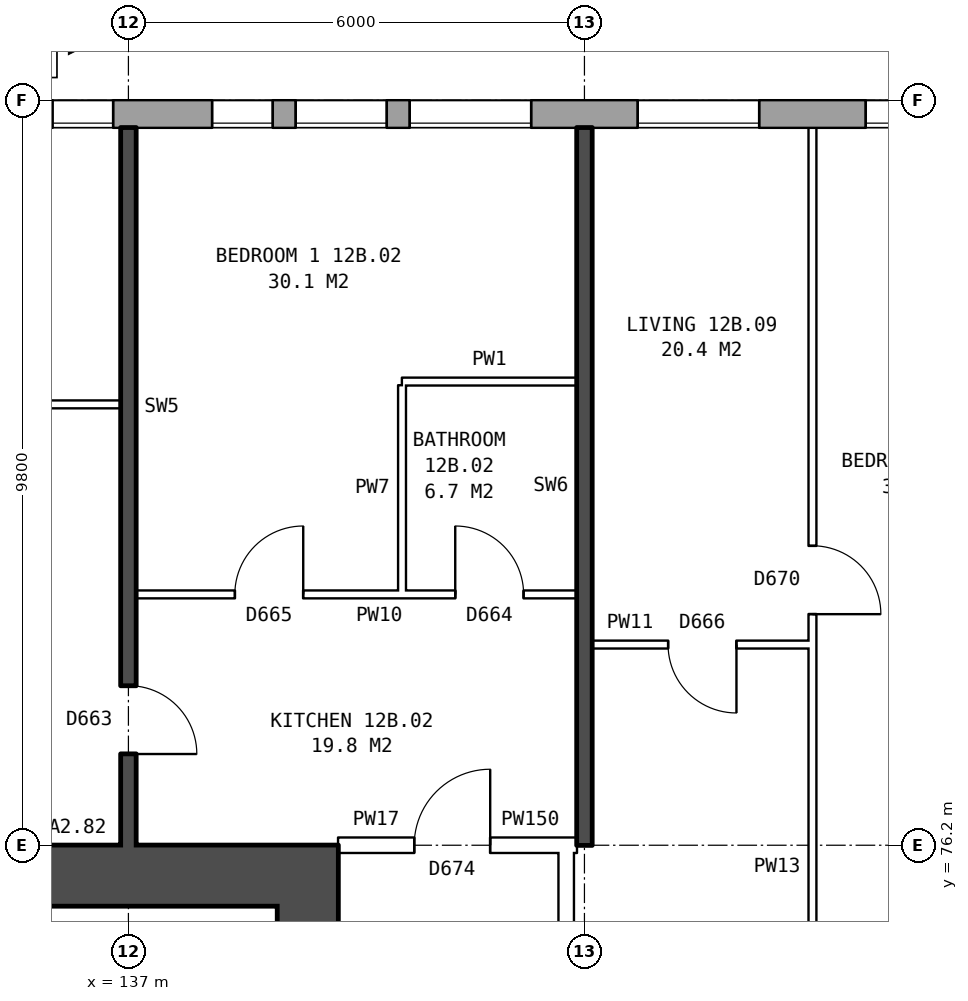
"""IFC4 building model, lengths in metres.
Left out: names, types, materials, properties, quantities, classifications, styles, units other than length and angle.
Written with IfcOpenShell. Run it as: python <this file> out.ifc"""

import sys

from ifc_helpers import new_model, si_unit, direction, frame, frame_2d, origin, place, context, subcontext, project, spatial, rectangle, extrude, element, fill, save


model = new_model("IFC4")
c1 = context("Model", 3, precision=1e-05, world=origin(), true_north=direction((0.0, 1.0)))
c2 = subcontext(c1, "Body", "Model", "MODEL_VIEW")
j1 = project(units=[si_unit("LENGTHUNIT", "METRE"), si_unit("PLANEANGLEUNIT", "RADIAN")], contexts=[c1])
p1 = place(None, origin())
s1 = spatial("IfcSite", under=j1, at=p1, CompositionType="ELEMENT")
p2 = place(p1, origin())
s2 = spatial("IfcBuilding", under=s1, at=p2, CompositionType="ELEMENT")
p3 = place(p2, frame((0.0, 0.0, 47.4)))
s3 = spatial("IfcBuildingStorey", under=s2, at=p3, CompositionType="ELEMENT", Elevation=47.4)
p4 = place(p3, frame((173.425, 85.82, 0.0), z_axis=(0.0, 0.0, 1.0), x_axis=(-1.0, 0.0, 0.0)))
e1 = element("IfcWall", 1, at=p4, inside=s3, PredefinedType="STANDARD", context=c2, shape_type="SweptSolid", body=[
    extrude(rectangle(XDim=39.351, YDim=0.36, at=frame_2d((19.675, 0.0))), origin(), (0.0, 0.0, 1.0), 2.85),
])
p5 = place(p4, frame((0.625, 0.0, 0.8)))
e2 = element("IfcOpeningElement", 2, at=p5, cuts=e1, PredefinedType="OPENING", context=c2, shape_type="SweptSolid", body=[
    extrude(rectangle(XDim=1.0, YDim=1.8, at=frame_2d((0.5, 0.9))), frame((0.0, 0.19, 0.0), z_axis=(0.0, -1.0, 0.0), x_axis=(1.0, 0.0, 0.0)), (0.0, 0.0, 1.0), 0.38),
])
p6 = place(p4, frame((1.925, 0.0, 1.7)))
e3 = element("IfcOpeningElement", 3, at=p6, cuts=e1, PredefinedType="OPENING", context=c2, shape_type="SweptSolid", body=[
    extrude(rectangle(XDim=0.8, YDim=0.9, at=frame_2d((0.4, 0.45))), frame((0.0, 0.19, 0.0), z_axis=(0.0, -1.0, 0.0), x_axis=(1.0, 0.0, 0.0)), (0.0, 0.0, 1.0), 0.38),
])
p7 = place(p4, frame((7.125, 0.0, 0.8)))
e4 = element("IfcOpeningElement", 4, at=p7, cuts=e1, PredefinedType="OPENING", context=c2, shape_type="SweptSolid", body=[
    extrude(rectangle(XDim=1.6, YDim=1.8, at=frame_2d((0.8, 0.9))), frame((0.0, 0.19, 0.0), z_axis=(0.0, -1.0, 0.0), x_axis=(1.0, 0.0, 0.0)), (0.0, 0.0, 1.0), 0.38),
])
p8 = place(p4, frame((10.125, 0.0, 0.8)))
e5 = element("IfcOpeningElement", 5, at=p8, cuts=e1, PredefinedType="OPENING", context=c2, shape_type="SweptSolid", body=[
    extrude(rectangle(XDim=1.6, YDim=1.8, at=frame_2d((0.8, 0.9))), frame((0.0, 0.19, 0.0), z_axis=(0.0, -1.0, 0.0), x_axis=(1.0, 0.0, 0.0)), (0.0, 0.0, 1.0), 0.38),
])
p9 = place(p4, frame((13.125, 0.0, 0.8)))
e6 = element("IfcOpeningElement", 6, at=p9, cuts=e1, PredefinedType="OPENING", context=c2, shape_type="SweptSolid", body=[
    extrude(rectangle(XDim=1.6, YDim=1.8, at=frame_2d((0.8, 0.9))), frame((0.0, 0.19, 0.0), z_axis=(0.0, -1.0, 0.0), x_axis=(1.0, 0.0, 0.0)), (0.0, 0.0, 1.0), 0.38),
])
p10 = place(p4, frame((16.125, 0.0, 0.8)))
e7 = element("IfcOpeningElement", 7, at=p10, cuts=e1, PredefinedType="OPENING", context=c2, shape_type="SweptSolid", body=[
    extrude(rectangle(XDim=1.6, YDim=1.8, at=frame_2d((0.8, 0.9))), frame((0.0, 0.19, 0.0), z_axis=(0.0, -1.0, 0.0), x_axis=(1.0, 0.0, 0.0)), (0.0, 0.0, 1.0), 0.38),
])
p11 = place(p4, frame((19.125, 0.0, 0.8)))
e8 = element("IfcOpeningElement", 8, at=p11, cuts=e1, PredefinedType="OPENING", context=c2, shape_type="SweptSolid", body=[
    extrude(rectangle(XDim=1.6, YDim=1.8, at=frame_2d((0.8, 0.9))), frame((0.0, 0.19, 0.0), z_axis=(0.0, -1.0, 0.0), x_axis=(1.0, 0.0, 0.0)), (0.0, 0.0, 1.0), 0.38),
])
p12 = place(p4, frame((22.125, 0.0, 0.8)))
e9 = element("IfcOpeningElement", 9, at=p12, cuts=e1, PredefinedType="OPENING", context=c2, shape_type="SweptSolid", body=[
    extrude(rectangle(XDim=1.6, YDim=1.8, at=frame_2d((0.8, 0.9))), frame((0.0, 0.19, 0.0), z_axis=(0.0, -1.0, 0.0), x_axis=(1.0, 0.0, 0.0)), (0.0, 0.0, 1.0), 0.38),
])
p13 = place(p4, frame((25.125, 0.0, 0.8)))
e10 = element("IfcOpeningElement", 10, at=p13, cuts=e1, PredefinedType="OPENING", context=c2, shape_type="SweptSolid", body=[
    extrude(rectangle(XDim=1.6, YDim=1.8, at=frame_2d((0.8, 0.9))), frame((0.0, 0.19, 0.0), z_axis=(0.0, -1.0, 0.0), x_axis=(1.0, 0.0, 0.0)), (0.0, 0.0, 1.0), 0.38),
])
p14 = place(p4, frame((28.125, 0.0, 0.8)))
e11 = element("IfcOpeningElement", 11, at=p14, cuts=e1, PredefinedType="OPENING", context=c2, shape_type="SweptSolid", body=[
    extrude(rectangle(XDim=1.6, YDim=1.8, at=frame_2d((0.8, 0.9))), frame((0.0, 0.19, 0.0), z_axis=(0.0, -1.0, 0.0), x_axis=(1.0, 0.0, 0.0)), (0.0, 0.0, 1.0), 0.38),
])
p15 = place(p4, frame((31.125, 0.0, 0.8)))
e12 = element("IfcOpeningElement", 12, at=p15, cuts=e1, PredefinedType="OPENING", context=c2, shape_type="SweptSolid", body=[
    extrude(rectangle(XDim=1.6, YDim=1.8, at=frame_2d((0.8, 0.9))), frame((0.0, 0.19, 0.0), z_axis=(0.0, -1.0, 0.0), x_axis=(1.0, 0.0, 0.0)), (0.0, 0.0, 1.0), 0.38),
])
p16 = place(p4, frame((33.025, 0.0, 0.8)))
e13 = element("IfcOpeningElement", 13, at=p16, cuts=e1, PredefinedType="OPENING", context=c2, shape_type="SweptSolid", body=[
    extrude(rectangle(XDim=1.2, YDim=1.8, at=frame_2d((0.6, 0.9))), frame((0.0, 0.19, 0.0), z_axis=(0.0, -1.0, 0.0), x_axis=(1.0, 0.0, 0.0)), (0.0, 0.0, 1.0), 0.38),
])
p17 = place(p4, frame((36.625, 0.0, 1.7)))
e14 = element("IfcOpeningElement", 14, at=p17, cuts=e1, PredefinedType="OPENING", context=c2, shape_type="SweptSolid", body=[
    extrude(rectangle(XDim=0.8, YDim=0.9, at=frame_2d((0.4, 0.45))), frame((0.0, 0.19, 0.0), z_axis=(0.0, -1.0, 0.0), x_axis=(1.0, 0.0, 0.0)), (0.0, 0.0, 1.0), 0.38),
])
p18 = place(p4, frame((3.925, 0.0, 0.8)))
e15 = element("IfcOpeningElement", 15, at=p18, cuts=e1, PredefinedType="OPENING", context=c2, shape_type="SweptSolid", body=[
    extrude(rectangle(XDim=0.8, YDim=0.9, at=frame_2d((0.4, 0.45))), frame((0.0, 0.19, 0.0), z_axis=(0.0, -1.0, 0.0), x_axis=(1.0, 0.0, 0.0)), (0.0, 0.0, 1.0), 0.38),
])
p19 = place(p4, frame((5.025, 0.0, 0.8)))
e16 = element("IfcOpeningElement", 16, at=p19, cuts=e1, PredefinedType="OPENING", context=c2, shape_type="SweptSolid", body=[
    extrude(rectangle(XDim=1.2, YDim=1.8, at=frame_2d((0.6, 0.9))), frame((0.0, 0.19, 0.0), z_axis=(0.0, -1.0, 0.0), x_axis=(1.0, 0.0, 0.0)), (0.0, 0.0, 1.0), 0.38),
])
p20 = place(p4, frame((34.525, 0.0, 0.8)))
e17 = element("IfcOpeningElement", 17, at=p20, cuts=e1, PredefinedType="OPENING", context=c2, shape_type="SweptSolid", body=[
    extrude(rectangle(XDim=0.8, YDim=0.9, at=frame_2d((0.4, 0.45))), frame((0.0, 0.19, 0.0), z_axis=(0.0, -1.0, 0.0), x_axis=(1.0, 0.0, 0.0)), (0.0, 0.0, 1.0), 0.38),
])
p21 = place(p4, frame((37.725, 0.0, 0.8)))
e18 = element("IfcOpeningElement", 18, at=p21, cuts=e1, PredefinedType="OPENING", context=c2, shape_type="SweptSolid", body=[
    extrude(rectangle(XDim=1.2, YDim=1.8, at=frame_2d((0.6, 0.9))), frame((0.0, 0.19, 0.0), z_axis=(0.0, -1.0, 0.0), x_axis=(1.0, 0.0, 0.0)), (0.0, 0.0, 1.0), 0.38),
])
p22 = place(p3, frame((139.36, 64.6, 0.0), z_axis=(0.0, 0.0, 1.0), x_axis=(0.0, 1.0, 0.0)))
e19 = element("IfcWall", 19, at=p22, inside=s3, PredefinedType="SHEAR", context=c2, shape_type="SweptSolid", body=[
    extrude(rectangle(XDim=10.8, YDim=0.8, at=frame_2d((5.4, 0.0))), origin(), (0.0, 0.0, 1.0), 2.85),
])
p23 = place(p22, frame((0.525, 0.0, 0.0)))
e20 = element("IfcOpeningElement", 20, at=p23, cuts=e19, PredefinedType="OPENING", context=c2, shape_type="SweptSolid", body=[
    extrude(rectangle(XDim=1.1, YDim=2.1, at=frame_2d((0.55, 1.05))), frame((0.0, 0.41, 0.0), z_axis=(0.0, -1.0, 0.0), x_axis=(1.0, 0.0, 0.0)), (0.0, 0.0, 1.0), 0.82),
])
p24 = place(p22, frame((9.1, 0.0, 0.0)))
e21 = element("IfcOpeningElement", 21, at=p24, cuts=e19, PredefinedType="OPENING", context=c2, shape_type="SweptSolid", body=[
    extrude(rectangle(XDim=1.1, YDim=2.1, at=frame_2d((0.55, 1.05))), frame((0.0, 0.41, 0.0), z_axis=(0.0, -1.0, 0.0), x_axis=(1.0, 0.0, 0.0)), (0.0, 0.0, 1.0), 0.82),
])
p25 = place(p22, frame((7.325, 0.0, 0.0)))
e22 = element("IfcOpeningElement", 22, at=p25, cuts=e19, PredefinedType="OPENING", context=c2, shape_type="SweptSolid", body=[
    extrude(rectangle(XDim=0.85, YDim=2.1, at=frame_2d((0.425, 1.05))), frame((0.0, 0.41, 0.0), z_axis=(0.0, -1.0, 0.0), x_axis=(1.0, 0.0, 0.0)), (0.0, 0.0, 1.0), 0.82),
])
p26 = place(p3, frame((139.76, 75.8, 0.0), z_axis=(0.0, 0.0, 1.0), x_axis=(-1.0, 0.0, 0.0)))
e23 = element("IfcWall", 23, at=p26, inside=s3, PredefinedType="SHEAR", context=c2, shape_type="SweptSolid", body=[
    extrude(rectangle(XDim=8.4, YDim=0.8, at=frame_2d((4.2, 0.0))), origin(), (0.0, 0.0, 1.0), 2.85),
])
p27 = place(p3, frame((142.76, 63.9, 0.0), z_axis=(0.0, 0.0, 1.0), x_axis=(0.0, 1.0, 0.0)))
e24 = element("IfcWall", 24, at=p27, inside=s3, PredefinedType="PARTITIONING", context=c2, shape_type="SweptSolid", body=[
    extrude(rectangle(XDim=12.2, YDim=0.2, at=frame_2d((6.1, 0.0))), origin(), (0.0, 0.0, 1.0), 2.85),
])
p28 = place(p27, frame((5.1, 0.0, 0.0)))
e25 = element("IfcOpeningElement", 25, at=p28, cuts=e24, PredefinedType="OPENING", context=c2, shape_type="SweptSolid", body=[
    extrude(rectangle(XDim=2.0, YDim=2.1, at=frame_2d((1.0, 1.05))), frame((0.0, 0.11, 0.0), z_axis=(0.0, -1.0, 0.0), x_axis=(1.0, 0.0, 0.0)), (0.0, 0.0, 1.0), 0.22),
])
p29 = place(p3, frame((139.76, 76.2, 0.0), z_axis=(0.0, 0.0, 1.0), x_axis=(1.0, 0.0, 0.0)))
e26 = element("IfcWall", 26, at=p29, inside=s3, PredefinedType="PARTITIONING", context=c2, shape_type="SweptSolid", body=[
    extrude(rectangle(XDim=3.0, YDim=0.2, at=frame_2d((1.5, 0.0))), origin(), (0.0, 0.0, 1.0), 2.85),
])
p30 = place(p29, frame((1.0, 0.0, 0.0)))
e27 = element("IfcOpeningElement", 27, at=p30, cuts=e26, PredefinedType="OPENING", context=c2, shape_type="SweptSolid", body=[
    extrude(rectangle(XDim=1.0, YDim=2.1, at=frame_2d((0.5, 1.05))), frame((0.0, 0.11, 0.0), z_axis=(0.0, -1.0, 0.0), x_axis=(1.0, 0.0, 0.0)), (0.0, 0.0, 1.0), 0.22),
])
p31 = place(p3, frame((142.76, 76.2, 0.0), z_axis=(0.0, 0.0, 1.0), x_axis=(1.0, 0.0, 0.0)))
e28 = element("IfcWall", 28, at=p31, inside=s3, PredefinedType="PARTITIONING", context=c2, shape_type="SweptSolid", body=[
    extrude(rectangle(XDim=0.14, YDim=0.2, at=frame_2d((0.07, 0.0))), origin(), (0.0, 0.0, 1.0), 2.85),
])
p32 = place(p3, frame((143.1, 78.84, 0.0), z_axis=(0.0, 0.0, 1.0), x_axis=(1.0, 0.0, 0.0)))
e29 = element("IfcWall", 29, at=p32, inside=s3, PredefinedType="PARTITIONING", context=c2, shape_type="SweptSolid", body=[
    extrude(rectangle(XDim=2.9, YDim=0.1, at=frame_2d((1.45, 0.0))), origin(), (0.0, 0.0, 1.0), 2.85),
])
p33 = place(p32, frame((1.0, 0.0, 0.0)))
e30 = element("IfcOpeningElement", 30, at=p33, cuts=e29, PredefinedType="OPENING", context=c2, shape_type="SweptSolid", body=[
    extrude(rectangle(XDim=0.9, YDim=2.1, at=frame_2d((0.45, 1.05))), frame((0.0, 0.06, 0.0), z_axis=(0.0, -1.0, 0.0), x_axis=(1.0, 0.0, 0.0)), (0.0, 0.0, 1.0), 0.12),
])
p34 = place(p3, frame((137.1, 79.5, 0.0), z_axis=(0.0, 0.0, 1.0), x_axis=(1.0, 0.0, 0.0)))
e31 = element("IfcWall", 31, at=p34, inside=s3, PredefinedType="PARTITIONING", context=c2, shape_type="SweptSolid", body=[
    extrude(rectangle(XDim=5.8, YDim=0.1, at=frame_2d((2.9, 0.0))), origin(), (0.0, 0.0, 1.0), 2.85),
])
p35 = place(p34, frame((1.3, 0.0, 0.0)))
e32 = element("IfcOpeningElement", 32, at=p35, cuts=e31, PredefinedType="OPENING", context=c2, shape_type="SweptSolid", body=[
    extrude(rectangle(XDim=0.9, YDim=2.1, at=frame_2d((0.45, 1.05))), frame((0.0, 0.06, 0.0), z_axis=(0.0, -1.0, 0.0), x_axis=(1.0, 0.0, 0.0)), (0.0, 0.0, 1.0), 0.12),
])
p36 = place(p34, frame((4.2, 0.0, 0.0)))
e33 = element("IfcOpeningElement", 33, at=p36, cuts=e31, PredefinedType="OPENING", context=c2, shape_type="SweptSolid", body=[
    extrude(rectangle(XDim=0.9, YDim=2.1, at=frame_2d((0.45, 1.05))), frame((0.0, 0.06, 0.0), z_axis=(0.0, -1.0, 0.0), x_axis=(1.0, 0.0, 0.0)), (0.0, 0.0, 1.0), 0.12),
])
p37 = place(p3, frame((131.36, 82.0, 0.0), z_axis=(0.0, 0.0, 1.0), x_axis=(1.0, 0.0, 0.0)))
e34 = element("IfcWall", 34, at=p37, inside=s3, PredefinedType="PARTITIONING", context=c2, shape_type="SweptSolid", body=[
    extrude(rectangle(XDim=5.54, YDim=0.1, at=frame_2d((2.77, 0.0))), origin(), (0.0, 0.0, 1.0), 2.85),
])
p38 = place(p37, frame((2.32, 0.0, 0.0)))
e35 = element("IfcOpeningElement", 35, at=p38, cuts=e34, PredefinedType="OPENING", context=c2, shape_type="SweptSolid", body=[
    extrude(rectangle(XDim=0.9, YDim=2.1, at=frame_2d((0.45, 1.05))), frame((0.0, 0.06, 0.0), z_axis=(0.0, -1.0, 0.0), x_axis=(1.0, 0.0, 0.0)), (0.0, 0.0, 1.0), 0.12),
])
p39 = place(p3, frame((140.6, 82.3, 0.0), z_axis=(0.0, 0.0, 1.0), x_axis=(1.0, 0.0, 0.0)))
e36 = element("IfcWall", 36, at=p39, inside=s3, PredefinedType="PARTITIONING", context=c2, shape_type="SweptSolid", body=[
    extrude(rectangle(XDim=2.3, YDim=0.1, at=frame_2d((1.15, 0.0))), origin(), (0.0, 0.0, 1.0), 2.85),
])
p40 = place(p3, frame((137.0, 76.2, 0.0), z_axis=(0.0, 0.0, 1.0), x_axis=(0.0, 1.0, 0.0)))
e37 = element("IfcWall", 37, at=p40, inside=s3, PredefinedType="SOLIDWALL", context=c2, shape_type="SweptSolid", body=[
    extrude(rectangle(XDim=9.44, YDim=0.2, at=frame_2d((4.72, 0.0))), origin(), (0.0, 0.0, 1.0), 2.85),
])
p41 = place(p40, frame((1.2, 0.0, 0.0)))
e38 = element("IfcOpeningElement", 38, at=p41, cuts=e37, PredefinedType="OPENING", context=c2, shape_type="SweptSolid", body=[
    extrude(rectangle(XDim=0.9, YDim=2.1, at=frame_2d((0.45, 1.05))), frame((0.0, 0.11, 0.0), z_axis=(0.0, -1.0, 0.0), x_axis=(1.0, 0.0, 0.0)), (0.0, 0.0, 1.0), 0.22),
])
p42 = place(p3, frame((140.6, 79.55, 0.0), z_axis=(0.0, 0.0, 1.0), x_axis=(0.0, 1.0, 0.0)))
e39 = element("IfcWall", 39, at=p42, inside=s3, PredefinedType="PARTITIONING", context=c2, shape_type="SweptSolid", body=[
    extrude(rectangle(XDim=2.7, YDim=0.1, at=frame_2d((1.35, 0.0))), origin(), (0.0, 0.0, 1.0), 2.85),
])
p43 = place(p3, frame((143.0, 76.2, 0.0), z_axis=(0.0, 0.0, 1.0), x_axis=(0.0, 1.0, 0.0)))
e40 = element("IfcWall", 40, at=p43, inside=s3, PredefinedType="SOLIDWALL", context=c2, shape_type="SweptSolid", body=[
    extrude(rectangle(XDim=9.44, YDim=0.2, at=frame_2d((4.72, 0.0))), origin(), (0.0, 0.0, 1.0), 2.85),
])
p44 = place(p3, frame((146.0, 71.3, 0.0), z_axis=(0.0, 0.0, 1.0), x_axis=(0.0, 1.0, 0.0)))
e41 = element("IfcWall", 41, at=p44, inside=s3, PredefinedType="PARTITIONING", context=c2, shape_type="SweptSolid", body=[
    extrude(rectangle(XDim=14.34, YDim=0.1, at=frame_2d((7.17, 0.0))), origin(), (0.0, 0.0, 1.0), 2.85),
])
p45 = place(p44, frame((7.94, 0.0, 0.0)))
e42 = element("IfcOpeningElement", 42, at=p45, cuts=e41, PredefinedType="OPENING", context=c2, shape_type="SweptSolid", body=[
    extrude(rectangle(XDim=0.9, YDim=2.1, at=frame_2d((0.45, 1.05))), frame((0.0, 0.06, 0.0), z_axis=(0.0, -1.0, 0.0), x_axis=(1.0, 0.0, 0.0)), (0.0, 0.0, 1.0), 0.12),
])
p46 = place(p44, frame((0.4, 0.0, 0.0)))
e43 = element("IfcOpeningElement", 43, at=p46, cuts=e41, PredefinedType="OPENING", context=c2, shape_type="SweptSolid", body=[
    extrude(rectangle(XDim=0.9, YDim=2.1, at=frame_2d((0.45, 1.05))), frame((0.0, 0.06, 0.0), z_axis=(0.0, -1.0, 0.0), x_axis=(1.0, 0.0, 0.0)), (0.0, 0.0, 1.0), 0.12),
])
p47 = place(p13, origin())
e44 = element("IfcWindow", 44, at=p47, inside=s3, PartitioningType="SINGLE_PANEL", PredefinedType="WINDOW", context=c2, shape_type="SweptSolid", body=[
    extrude(rectangle(XDim=1.6, YDim=1.8, at=frame_2d((0.8, 0.9))), frame((0.0, 0.15, 0.0), z_axis=(0.0, -1.0, 0.0), x_axis=(1.0, 0.0, 0.0)), (0.0, 0.0, 1.0), 0.06),
])
fill(e10, e44)
p48 = place(p14, origin())
e45 = element("IfcWindow", 45, at=p48, inside=s3, PartitioningType="SINGLE_PANEL", PredefinedType="WINDOW", context=c2, shape_type="SweptSolid", body=[
    extrude(rectangle(XDim=1.6, YDim=1.8, at=frame_2d((0.8, 0.9))), frame((0.0, 0.15, 0.0), z_axis=(0.0, -1.0, 0.0), x_axis=(1.0, 0.0, 0.0)), (0.0, 0.0, 1.0), 0.06),
])
fill(e11, e45)
p49 = place(p15, origin())
e46 = element("IfcWindow", 46, at=p49, inside=s3, PartitioningType="SINGLE_PANEL", PredefinedType="WINDOW", context=c2, shape_type="SweptSolid", body=[
    extrude(rectangle(XDim=1.6, YDim=1.8, at=frame_2d((0.8, 0.9))), frame((0.0, 0.15, 0.0), z_axis=(0.0, -1.0, 0.0), x_axis=(1.0, 0.0, 0.0)), (0.0, 0.0, 1.0), 0.06),
])
fill(e12, e46)
p50 = place(p16, origin())
e47 = element("IfcWindow", 47, at=p50, inside=s3, PartitioningType="SINGLE_PANEL", PredefinedType="WINDOW", context=c2, shape_type="SweptSolid", body=[
    extrude(rectangle(XDim=1.2, YDim=1.8, at=frame_2d((0.6, 0.9))), frame((0.0, 0.15, 0.0), z_axis=(0.0, -1.0, 0.0), x_axis=(1.0, 0.0, 0.0)), (0.0, 0.0, 1.0), 0.06),
])
fill(e13, e47)
p51 = place(p17, origin())
e48 = element("IfcWindow", 48, at=p51, inside=s3, PartitioningType="SINGLE_PANEL", PredefinedType="WINDOW", context=c2, shape_type="SweptSolid", body=[
    extrude(rectangle(XDim=0.8, YDim=0.9, at=frame_2d((0.4, 0.45))), frame((0.0, 0.15, 0.0), z_axis=(0.0, -1.0, 0.0), x_axis=(1.0, 0.0, 0.0)), (0.0, 0.0, 1.0), 0.06),
])
fill(e14, e48)
p52 = place(p35, origin())
e49 = element("IfcDoor", 49, at=p52, inside=s3, OperationType="SINGLE_SWING_RIGHT", PredefinedType="DOOR", context=c2, shape_type="SweptSolid", body=[
    extrude(rectangle(XDim=0.9, YDim=2.1, at=frame_2d((0.45, 1.05))), frame((0.0, 0.025, 0.0), z_axis=(0.0, -1.0, 0.0), x_axis=(1.0, 0.0, 0.0)), (0.0, 0.0, 1.0), 0.05),
])
fill(e32, e49)
p53 = place(p30, origin())
e50 = element("IfcDoor", 50, at=p53, inside=s3, OperationType="SINGLE_SWING_RIGHT", PredefinedType="DOOR", context=c2, shape_type="SweptSolid", body=[
    extrude(rectangle(XDim=1.0, YDim=2.1, at=frame_2d((0.5, 1.05))), frame((0.0, 0.025, 0.0), z_axis=(0.0, -1.0, 0.0), x_axis=(1.0, 0.0, 0.0)), (0.0, 0.0, 1.0), 0.05),
])
fill(e27, e50)
p54 = place(p41, frame((0.9, 0.0, 0.0), z_axis=(0.0, 0.0, 1.0), x_axis=(-1.0, 0.0, 0.0)))
e51 = element("IfcDoor", 51, at=p54, inside=s3, OperationType="SINGLE_SWING_RIGHT", PredefinedType="DOOR", context=c2, shape_type="SweptSolid", body=[
    extrude(rectangle(XDim=0.9, YDim=2.1, at=frame_2d((0.45, 1.05))), frame((0.0, 0.025, 0.0), z_axis=(0.0, -1.0, 0.0), x_axis=(1.0, 0.0, 0.0)), (0.0, 0.0, 1.0), 0.05),
])
fill(e38, e51)
p55 = place(p36, origin())
e52 = element("IfcDoor", 52, at=p55, inside=s3, OperationType="SINGLE_SWING_LEFT", PredefinedType="DOOR", context=c2, shape_type="SweptSolid", body=[
    extrude(rectangle(XDim=0.9, YDim=2.1, at=frame_2d((0.45, 1.05))), frame((0.0, 0.025, 0.0), z_axis=(0.0, -1.0, 0.0), x_axis=(1.0, 0.0, 0.0)), (0.0, 0.0, 1.0), 0.05),
])
fill(e33, e52)
p56 = place(p45, frame((0.9, 0.0, 0.0), z_axis=(0.0, 0.0, 1.0), x_axis=(-1.0, 0.0, 0.0)))
e53 = element("IfcDoor", 53, at=p56, inside=s3, OperationType="SINGLE_SWING_RIGHT", PredefinedType="DOOR", context=c2, shape_type="SweptSolid", body=[
    extrude(rectangle(XDim=0.9, YDim=2.1, at=frame_2d((0.45, 1.05))), frame((0.0, 0.025, 0.0), z_axis=(0.0, -1.0, 0.0), x_axis=(1.0, 0.0, 0.0)), (0.0, 0.0, 1.0), 0.05),
])
fill(e42, e53)
p57 = place(p33, frame((0.9, 0.0, 0.0), z_axis=(0.0, 0.0, 1.0), x_axis=(-1.0, 0.0, 0.0)))
e54 = element("IfcDoor", 54, at=p57, inside=s3, OperationType="SINGLE_SWING_LEFT", PredefinedType="DOOR", context=c2, shape_type="SweptSolid", body=[
    extrude(rectangle(XDim=0.9, YDim=2.1, at=frame_2d((0.45, 1.05))), frame((0.0, 0.025, 0.0), z_axis=(0.0, -1.0, 0.0), x_axis=(1.0, 0.0, 0.0)), (0.0, 0.0, 1.0), 0.05),
])
fill(e30, e54)
p58 = place(p20, origin())
e55 = element("IfcWindow", 55, at=p58, inside=s3, PartitioningType="SINGLE_PANEL", PredefinedType="WINDOW", context=c2, shape_type="SweptSolid", body=[
    extrude(rectangle(XDim=0.8, YDim=0.9, at=frame_2d((0.4, 0.45))), frame((0.0, 0.15, 0.0), z_axis=(0.0, -1.0, 0.0), x_axis=(1.0, 0.0, 0.0)), (0.0, 0.0, 1.0), 0.06),
])
fill(e17, e55)
save(model, sys.argv[1])
